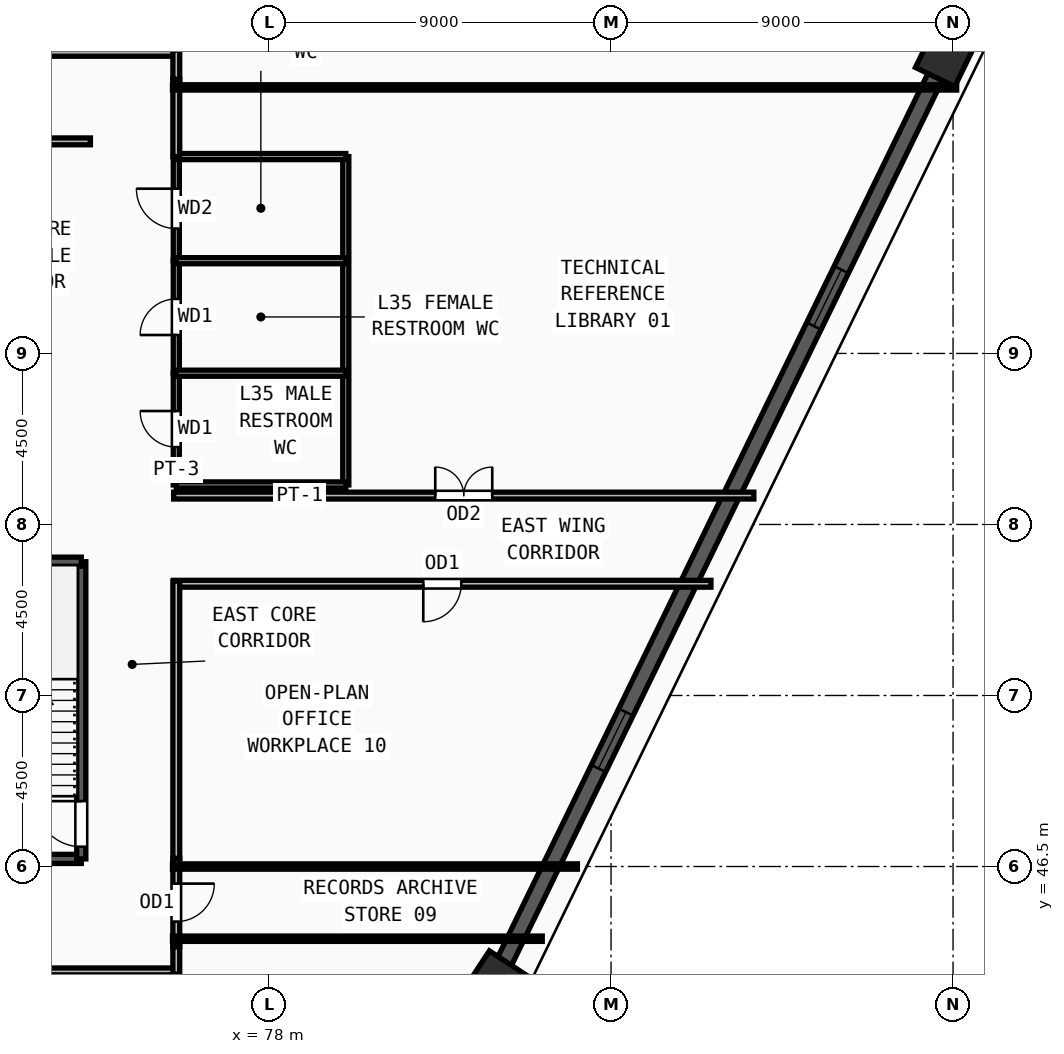
"""IFC4 building model, lengths in metres.
Left out: names, types, materials, properties, quantities, classifications, styles, units other than length and angle.
Written with IfcOpenShell. Run it as: python <this file> out.ifc"""

import sys

from ifc_helpers import new_model, si_unit, direction, frame, frame_2d, origin, origin_2d, place, context, subcontext, project, spatial, rectangle, extrude, source, transform, mapped, element, fill, save


model = new_model("IFC4")
c1 = context("Model", 3, precision=1e-05, world=origin(), true_north=direction((0.0, 1.0)))
c2 = subcontext(c1, "Body", "Model", "MODEL_VIEW")
j1 = project(units=[si_unit("LENGTHUNIT", "METRE"), si_unit("PLANEANGLEUNIT", "RADIAN")], contexts=[c1])
p1 = place(None, origin())
s1 = spatial("IfcSite", under=j1, at=p1, CompositionType="ELEMENT")
p2 = place(p1, origin())
s2 = spatial("IfcBuilding", under=s1, at=p2, CompositionType="ELEMENT")
p3 = place(p2, frame((0.0, 0.0, 135.75)))
s3 = spatial("IfcBuildingStorey", under=s2, at=p3, CompositionType="ELEMENT", Elevation=135.75)
m1 = source(origin(), c2, "Body", "SweptSolid", [
    extrude(rectangle(XDim=1.4, YDim=1.15, at=origin_2d()), origin(), (0.0, 0.0, 1.0), 3.75),
])
for number, where, z_axis, x_axis in (
    (1, (95.834, 67.903, 0.0), (0.0, 0.0, 1.0), (0.438, 0.899, 0.0)),
    (2, (83.895, 43.38, 0.0), (0.0, 0.0, 1.0), (0.55, 0.835, 0.0)),
):
    element("IfcColumn", number, at=place(p3, frame(where, z_axis=z_axis, x_axis=x_axis)), inside=s3, PredefinedType="COLUMN", context=c2, shape_type="MappedRepresentation", body=[
        mapped(m1, transform((0.0, 0.0, 0.0), x_axis=(1.0, 0.0, 0.0), y_axis=(0.0, 1.0, 0.0), z_axis=(0.0, 0.0, 1.0), scale=1.0)),
    ])
p4 = place(p3, frame((84.197, 44.0, 0.0), z_axis=(0.0, 0.0, 1.0), x_axis=(0.4377191358, 0.899111760658, 0.0)))
e3 = element("IfcWall", 3, at=p4, inside=s3, PredefinedType="SOLIDWALL", context=c2, shape_type="SweptSolid", body=[
    extrude(rectangle(XDim=25.896, YDim=0.42, at=frame_2d((12.948, 0.0))), origin(), (0.0, 0.0, 1.0), 3.47),
])
m2 = source(origin(), c2, "Body", "SweptSolid", [
    extrude(rectangle(XDim=1.65, YDim=1.95, at=frame_2d((0.825, 0.975))), frame((0.0, 0.22, 0.0), z_axis=(0.0, -1.0, 0.0), x_axis=(1.0, 0.0, 0.0)), (0.0, 0.0, 1.0), 0.44),
])
p5 = place(p4, frame((5.649, 0.0, 0.55)))
e4 = element("IfcOpeningElement", 4, at=p5, cuts=e3, PredefinedType="OPENING", context=c2, shape_type="MappedRepresentation", body=[
    mapped(m2, transform((0.0, 0.0, 0.0), x_axis=(1.0, 0.0, 0.0), y_axis=(0.0, 1.0, 0.0), z_axis=(0.0, 0.0, 1.0), scale=1.0)),
])
p6 = place(p4, frame((18.597, 0.0, 0.55)))
e5 = element("IfcOpeningElement", 5, at=p6, cuts=e3, PredefinedType="OPENING", context=c2, shape_type="MappedRepresentation", body=[
    mapped(m2, transform((0.0, 0.0, 0.0), x_axis=(1.0, 0.0, 0.0), y_axis=(0.0, 1.0, 0.0), z_axis=(0.0, 0.0, 1.0), scale=1.0)),
])
p7 = place(p3, frame((69.62, 46.7, 0.0), z_axis=(0.0, 0.0, 1.0), x_axis=(1.0, 0.0, 0.0)))
e6 = element("IfcWall", 6, at=p7, inside=s3, PredefinedType="SOLIDWALL", context=c2, shape_type="SweptSolid", body=[
    extrude(rectangle(XDim=3.44, YDim=0.24, at=frame_2d((1.72, 0.0))), origin(), (0.0, 0.0, 1.0), 3.47),
])
p8 = place(p3, frame((73.06, 46.7, 0.0), z_axis=(0.0, 0.0, 1.0), x_axis=(0.0, 1.0, 0.0)))
e7 = element("IfcWall", 7, at=p8, inside=s3, PredefinedType="SOLIDWALL", context=c2, shape_type="SweptSolid", body=[
    extrude(rectangle(XDim=7.82, YDim=0.24, at=frame_2d((3.91, 0.0))), origin(), (0.0, 0.0, 1.0), 3.47),
])
m3 = source(origin(), c2, "Body", "SweptSolid", [
    extrude(rectangle(XDim=1.2, YDim=2.2, at=frame_2d((0.6, 1.1))), frame((0.0, 0.13, 0.0), z_axis=(0.0, -1.0, 0.0), x_axis=(1.0, 0.0, 0.0)), (0.0, 0.0, 1.0), 0.26),
])
p9 = place(p8, frame((0.32, 0.0, 0.0)))
e8 = element("IfcOpeningElement", 8, at=p9, cuts=e7, PredefinedType="OPENING", context=c2, shape_type="MappedRepresentation", body=[
    mapped(m3, transform((0.0, 0.0, 0.0), x_axis=(1.0, 0.0, 0.0), y_axis=(0.0, 1.0, 0.0), z_axis=(0.0, 0.0, 1.0), scale=1.0)),
])
p10 = place(p3, frame((73.06, 54.52, 0.0), z_axis=(0.0, 0.0, 1.0), x_axis=(-1.0, 0.0, 0.0)))
e9 = element("IfcWall", 9, at=p10, inside=s3, PredefinedType="SOLIDWALL", context=c2, shape_type="SweptSolid", body=[
    extrude(rectangle(XDim=3.44, YDim=0.24, at=frame_2d((1.72, 0.0))), origin(), (0.0, 0.0, 1.0), 3.47),
])
p11 = place(p3, frame((75.56, 56.54, 0.0), z_axis=(0.0, 0.0, 1.0), x_axis=(0.0, 1.0, 0.0)))
e10 = element("IfcWall", 10, at=p11, inside=s3, PredefinedType="PARTITIONING", context=c2, shape_type="SweptSolid", body=[
    extrude(rectangle(XDim=2.94, YDim=0.16, at=frame_2d((1.47, 0.0))), origin(), (0.0, 0.0, 1.0), 3.47),
])
m4 = source(origin(), c2, "Body", "SweptSolid", [
    extrude(rectangle(XDim=0.95, YDim=2.15, at=frame_2d((0.475, 1.075))), frame((0.0, 0.09, 0.0), z_axis=(0.0, -1.0, 0.0), x_axis=(1.0, 0.0, 0.0)), (0.0, 0.0, 1.0), 0.18),
])
p12 = place(p11, frame((0.995, 0.0, 0.0)))
e11 = element("IfcOpeningElement", 11, at=p12, cuts=e10, PredefinedType="OPENING", context=c2, shape_type="MappedRepresentation", body=[
    mapped(m4, transform((0.0, 0.0, 0.0), x_axis=(1.0, 0.0, 0.0), y_axis=(0.0, 1.0, 0.0), z_axis=(0.0, 0.0, 1.0), scale=1.0)),
])
p13 = place(p3, frame((75.56, 59.48, 0.0), z_axis=(0.0, 0.0, 1.0), x_axis=(0.0, 1.0, 0.0)))
e12 = element("IfcWall", 12, at=p13, inside=s3, PredefinedType="PARTITIONING", context=c2, shape_type="SweptSolid", body=[
    extrude(rectangle(XDim=2.96, YDim=0.16, at=frame_2d((1.48, 0.0))), origin(), (0.0, 0.0, 1.0), 3.47),
])
p14 = place(p13, frame((1.005, 0.0, 0.0)))
e13 = element("IfcOpeningElement", 13, at=p14, cuts=e12, PredefinedType="OPENING", context=c2, shape_type="MappedRepresentation", body=[
    mapped(m4, transform((0.0, 0.0, 0.0), x_axis=(1.0, 0.0, 0.0), y_axis=(0.0, 1.0, 0.0), z_axis=(0.0, 0.0, 1.0), scale=1.0)),
])
p15 = place(p3, frame((75.56, 62.44, 0.0), z_axis=(0.0, 0.0, 1.0), x_axis=(0.0, 1.0, 0.0)))
e14 = element("IfcWall", 14, at=p15, inside=s3, PredefinedType="PARTITIONING", context=c2, shape_type="SweptSolid", body=[
    extrude(rectangle(XDim=2.74, YDim=0.16, at=frame_2d((1.37, 0.0))), origin(), (0.0, 0.0, 1.0), 3.47),
])
m5 = source(origin(), c2, "Body", "SweptSolid", [
    extrude(rectangle(XDim=1.05, YDim=2.15, at=frame_2d((0.525, 1.075))), frame((0.0, 0.09, 0.0), z_axis=(0.0, -1.0, 0.0), x_axis=(1.0, 0.0, 0.0)), (0.0, 0.0, 1.0), 0.18),
])
p16 = place(p15, frame((0.845, 0.0, 0.0)))
e15 = element("IfcOpeningElement", 15, at=p16, cuts=e14, PredefinedType="OPENING", context=c2, shape_type="MappedRepresentation", body=[
    mapped(m5, transform((0.0, 0.0, 0.0), x_axis=(1.0, 0.0, 0.0), y_axis=(0.0, 1.0, 0.0), z_axis=(0.0, 0.0, 1.0), scale=1.0)),
])
p17 = place(p3, frame((69.46, 65.58, 0.0), z_axis=(0.0, 0.0, 1.0), x_axis=(1.0, 0.0, 0.0)))
e16 = element("IfcWall", 16, at=p17, inside=s3, PredefinedType="PARTITIONING", context=c2, shape_type="SweptSolid", body=[
    extrude(rectangle(XDim=3.84, YDim=0.18, at=frame_2d((1.92, 0.0))), origin(), (0.0, 0.0, 1.0), 3.47),
])
m6 = source(origin(), c2, "Body", "SweptSolid", [
    extrude(rectangle(XDim=1.3, YDim=2.2, at=frame_2d((0.65, 1.1))), frame((0.0, 0.1, 0.0), z_axis=(0.0, -1.0, 0.0), x_axis=(1.0, 0.0, 0.0)), (0.0, 0.0, 1.0), 0.2),
])
p18 = place(p17, frame((1.27, 0.0, 0.0)))
e17 = element("IfcOpeningElement", 17, at=p18, cuts=e16, PredefinedType="OPENING", context=c2, shape_type="MappedRepresentation", body=[
    mapped(m6, transform((0.0, 0.0, 0.0), x_axis=(1.0, 0.0, 0.0), y_axis=(0.0, 1.0, 0.0), z_axis=(0.0, 0.0, 1.0), scale=1.0)),
])
p19 = place(p3, frame((75.49, 56.26, 0.0), z_axis=(0.0, 0.0, 1.0), x_axis=(1.0, 0.0, 0.0)))
e18 = element("IfcWall", 18, at=p19, inside=s3, PredefinedType="PARTITIONING", context=c2, shape_type="SweptSolid", body=[
    extrude(rectangle(XDim=15.268, YDim=0.18, at=frame_2d((7.634, 0.0))), origin(), (0.0, 0.0, 1.0), 3.47),
])
m7 = source(origin(), c2, "Body", "SweptSolid", [
    extrude(rectangle(XDim=1.5, YDim=2.2, at=frame_2d((0.75, 1.1))), frame((0.0, 0.1, 0.0), z_axis=(0.0, -1.0, 0.0), x_axis=(1.0, 0.0, 0.0)), (0.0, 0.0, 1.0), 0.2),
])
p20 = place(p19, frame((6.884, 0.0, 0.0)))
e19 = element("IfcOpeningElement", 19, at=p20, cuts=e18, PredefinedType="OPENING", context=c2, shape_type="MappedRepresentation", body=[
    mapped(m7, transform((0.0, 0.0, 0.0), x_axis=(1.0, 0.0, 0.0), y_axis=(0.0, 1.0, 0.0), z_axis=(0.0, 0.0, 1.0), scale=1.0)),
])
p21 = place(p3, frame((44.37, 67.91, 0.0), z_axis=(0.0, 0.0, 1.0), x_axis=(1.0, 0.0, 0.0)))
e20 = element("IfcWall", 20, at=p21, inside=s3, PredefinedType="PARTITIONING", context=c2, shape_type="SweptSolid", body=[
    extrude(rectangle(XDim=31.26, YDim=0.18, at=frame_2d((15.63, 0.0))), origin(), (0.0, 0.0, 1.0), 3.47),
])
p22 = place(p21, frame((14.88, 0.0, 0.0)))
e21 = element("IfcOpeningElement", 21, at=p22, cuts=e20, PredefinedType="OPENING", context=c2, shape_type="MappedRepresentation", body=[
    mapped(m7, transform((0.0, 0.0, 0.0), x_axis=(1.0, 0.0, 0.0), y_axis=(0.0, 1.0, 0.0), z_axis=(0.0, 0.0, 1.0), scale=1.0)),
])
p23 = place(p3, frame((75.63, 43.74, 0.0), z_axis=(0.0, 0.0, 1.0), x_axis=(-1.0, 0.0, 0.0)))
e22 = element("IfcWall", 22, at=p23, inside=s3, PredefinedType="PARTITIONING", context=c2, shape_type="SweptSolid", body=[
    extrude(rectangle(XDim=31.26, YDim=0.18, at=frame_2d((15.63, 0.0))), origin(), (0.0, 0.0, 1.0), 3.47),
])
p24 = place(p23, frame((10.08, 0.0, 0.0)))
e23 = element("IfcOpeningElement", 23, at=p24, cuts=e22, PredefinedType="OPENING", context=c2, shape_type="MappedRepresentation", body=[
    mapped(m7, transform((0.0, 0.0, 0.0), x_axis=(1.0, 0.0, 0.0), y_axis=(0.0, 1.0, 0.0), z_axis=(0.0, 0.0, 1.0), scale=1.0)),
])
p25 = place(p3, frame((75.56, 46.715, 0.0), z_axis=(0.0, 0.0, 1.0), x_axis=(0.0, -1.0, 0.0)))
e24 = element("IfcWall", 24, at=p25, inside=s3, PredefinedType="PARTITIONING", context=c2, shape_type="SweptSolid", body=[
    extrude(rectangle(XDim=2.33, YDim=0.18, at=frame_2d((1.165, 0.0))), origin(), (0.0, 0.0, 1.0), 3.055),
])
m8 = source(origin(), c2, "Body", "SweptSolid", [
    extrude(rectangle(XDim=1.0, YDim=2.2, at=frame_2d((0.5, 1.1))), frame((0.0, 0.1, 0.0), z_axis=(0.0, -1.0, 0.0), x_axis=(1.0, 0.0, 0.0)), (0.0, 0.0, 1.0), 0.2),
])
p26 = place(p25, frame((0.665, 0.0, 0.0)))
e25 = element("IfcOpeningElement", 25, at=p26, cuts=e24, PredefinedType="OPENING", context=c2, shape_type="MappedRepresentation", body=[
    mapped(m8, transform((0.0, 0.0, 0.0), x_axis=(1.0, 0.0, 0.0), y_axis=(0.0, 1.0, 0.0), z_axis=(0.0, 0.0, 1.0), scale=1.0)),
])
p27 = place(p3, frame((89.629, 53.94, 0.0), z_axis=(0.0, 0.0, 1.0), x_axis=(-1.0, 0.0, 0.0)))
e26 = element("IfcWall", 26, at=p27, inside=s3, PredefinedType="PARTITIONING", context=c2, shape_type="SweptSolid", body=[
    extrude(rectangle(XDim=14.139, YDim=0.18, at=frame_2d((7.069, 0.0))), origin(), (0.0, 0.0, 1.0), 3.47),
])
p28 = place(p27, frame((6.57, 0.0, 0.0)))
e27 = element("IfcOpeningElement", 27, at=p28, cuts=e26, PredefinedType="OPENING", context=c2, shape_type="MappedRepresentation", body=[
    mapped(m8, transform((0.0, 0.0, 0.0), x_axis=(1.0, 0.0, 0.0), y_axis=(0.0, 1.0, 0.0), z_axis=(0.0, 0.0, 1.0), scale=1.0)),
])
p29 = place(p3, frame((80.02, 56.54, 0.0), z_axis=(0.0, 0.0, 1.0), x_axis=(0.0, 1.0, 0.0)))
e28 = element("IfcWall", 28, at=p29, inside=s3, PredefinedType="PARTITIONING", context=c2, shape_type="SweptSolid", body=[
    extrude(rectangle(XDim=8.64, YDim=0.16, at=frame_2d((4.32, 0.0))), origin(), (0.0, 0.0, 1.0), 3.055),
])
for number, where, z_axis, x_axis in (
    (29, (75.56, 56.54, 0.0), (0.0, 0.0, 1.0), (1.0, 0.0, 0.0)),
    (30, (75.56, 59.48, 0.0), (0.0, 0.0, 1.0), (1.0, 0.0, 0.0)),
    (31, (75.56, 62.44, 0.0), (0.0, 0.0, 1.0), (1.0, 0.0, 0.0)),
    (32, (75.56, 65.18, 0.0), (0.0, 0.0, 1.0), (1.0, 0.0, 0.0)),
):
    element("IfcWall", number, at=place(p3, frame(where, z_axis=z_axis, x_axis=x_axis)), inside=s3, PredefinedType="PARTITIONING", context=c2, shape_type="SweptSolid", body=[
        extrude(rectangle(XDim=4.46, YDim=0.16, at=frame_2d((2.23, 0.0))), origin(), (0.0, 0.0, 1.0), 3.47),
    ])
p30 = place(p3, frame((75.56, 67.215, 0.0), z_axis=(0.0, 0.0, 1.0), x_axis=(0.0, -1.0, 0.0)))
e33 = element("IfcWall", 33, at=p30, inside=s3, PredefinedType="PARTITIONING", context=c2, shape_type="SweptSolid", body=[
    extrude(rectangle(XDim=2.035, YDim=0.18, at=frame_2d((1.018, 0.0))), origin(), (0.0, 0.0, 1.0), 3.47),
])
p31 = place(p3, frame((75.56, 67.98, 0.0), z_axis=(0.0, 0.0, 1.0), x_axis=(0.0, -1.0, 0.0)))
e34 = element("IfcWall", 34, at=p31, inside=s3, PredefinedType="PARTITIONING", context=c2, shape_type="SweptSolid", body=[
    extrude(rectangle(XDim=0.765, YDim=0.18, at=frame_2d((0.382, 0.0))), origin(), (0.0, 0.0, 1.0), 3.47),
])
p32 = place(p3, frame((75.56, 44.385, 0.0), z_axis=(0.0, 0.0, 1.0), x_axis=(0.0, -1.0, 0.0)))
e35 = element("IfcWall", 35, at=p32, inside=s3, PredefinedType="PARTITIONING", context=c2, shape_type="SweptSolid", body=[
    extrude(rectangle(XDim=0.715, YDim=0.18, at=frame_2d((0.357, 0.0))), origin(), (0.0, 0.0, 1.0), 3.47),
])
p33 = place(p3, frame((75.56, 54.01, 0.0), z_axis=(0.0, 0.0, 1.0), x_axis=(0.0, -1.0, 0.0)))
e36 = element("IfcWall", 36, at=p33, inside=s3, PredefinedType="PARTITIONING", context=c2, shape_type="SweptSolid", body=[
    extrude(rectangle(XDim=7.295, YDim=0.18, at=frame_2d((3.647, 0.0))), origin(), (0.0, 0.0, 1.0), 3.47),
])
p34 = place(p3, frame((75.46, 44.6, 0.0), z_axis=(0.0, 0.0, 1.0), x_axis=(1.0, 0.0, 0.0)))
e37 = element("IfcWall", 37, at=p34, inside=s3, PredefinedType="PARTITIONING", context=c2, shape_type="SweptSolid", body=[
    extrude(rectangle(XDim=9.73, YDim=0.14, at=frame_2d((4.865, 0.0))), origin(), (0.0, 0.0, 1.0), 3.47),
])
p35 = place(p3, frame((75.46, 46.5, 0.0), z_axis=(0.0, 0.0, 1.0), x_axis=(1.0, 0.0, 0.0)))
e38 = element("IfcWall", 38, at=p35, inside=s3, PredefinedType="PARTITIONING", context=c2, shape_type="SweptSolid", body=[
    extrude(rectangle(XDim=10.655, YDim=0.14, at=frame_2d((5.328, 0.0))), origin(), (0.0, 0.0, 1.0), 3.47),
])
p36 = place(p3, frame((75.46, 67.0, 0.0), z_axis=(0.0, 0.0, 1.0), x_axis=(1.0, 0.0, 0.0)))
e39 = element("IfcWall", 39, at=p36, inside=s3, PredefinedType="PARTITIONING", context=c2, shape_type="SweptSolid", body=[
    extrude(rectangle(XDim=20.635, YDim=0.14, at=frame_2d((10.317, 0.0))), origin(), (0.0, 0.0, 1.0), 2.655),
])
m9 = source(origin(), c2, "Body", "SweptSolid", [
    extrude(rectangle(XDim=1.65, YDim=1.95, at=frame_2d((0.825, 0.975))), frame((0.0, 0.03, 0.0), z_axis=(0.0, -1.0, 0.0), x_axis=(1.0, 0.0, 0.0)), (0.0, 0.0, 1.0), 0.06),
])
p37 = place(p5, origin())
e40 = element("IfcWindow", 40, at=p37, inside=s3, PartitioningType="DOUBLE_PANEL_VERTICAL", PredefinedType="WINDOW", context=c2, shape_type="MappedRepresentation", body=[
    mapped(m9, transform((0.0, 0.0, 0.0), x_axis=(1.0, 0.0, 0.0), y_axis=(0.0, 1.0, 0.0), z_axis=(0.0, 0.0, 1.0), scale=1.0)),
])
fill(e4, e40)
p38 = place(p6, origin())
e41 = element("IfcWindow", 41, at=p38, inside=s3, PartitioningType="DOUBLE_PANEL_VERTICAL", PredefinedType="WINDOW", context=c2, shape_type="MappedRepresentation", body=[
    mapped(m9, transform((0.0, 0.0, 0.0), x_axis=(1.0, 0.0, 0.0), y_axis=(0.0, 1.0, 0.0), z_axis=(0.0, 0.0, 1.0), scale=1.0)),
])
fill(e5, e41)
m10 = source(origin(), c2, "Body", "SweptSolid", [
    extrude(rectangle(XDim=1.2, YDim=2.2, at=frame_2d((0.6, 1.1))), frame((0.0, 0.025, 0.0), z_axis=(0.0, -1.0, 0.0), x_axis=(1.0, 0.0, 0.0)), (0.0, 0.0, 1.0), 0.05),
])
p39 = place(p9, origin())
e42 = element("IfcDoor", 42, at=p39, inside=s3, OperationType="SINGLE_SWING_RIGHT", PredefinedType="DOOR", context=c2, shape_type="MappedRepresentation", body=[
    mapped(m10, transform((0.0, 0.0, 0.0), x_axis=(1.0, 0.0, 0.0), y_axis=(0.0, 1.0, 0.0), z_axis=(0.0, 0.0, 1.0), scale=1.0)),
])
fill(e8, e42)
m11 = source(origin(), c2, "Body", "SweptSolid", [
    extrude(rectangle(XDim=0.95, YDim=2.15, at=frame_2d((0.475, 1.075))), frame((0.0, 0.025, 0.0), z_axis=(0.0, -1.0, 0.0), x_axis=(1.0, 0.0, 0.0)), (0.0, 0.0, 1.0), 0.05),
])
p40 = place(p12, origin())
e43 = element("IfcDoor", 43, at=p40, inside=s3, OperationType="SINGLE_SWING_RIGHT", PredefinedType="DOOR", context=c2, shape_type="MappedRepresentation", body=[
    mapped(m11, transform((0.0, 0.0, 0.0), x_axis=(1.0, 0.0, 0.0), y_axis=(0.0, 1.0, 0.0), z_axis=(0.0, 0.0, 1.0), scale=1.0)),
])
fill(e11, e43)
p41 = place(p14, origin())
e44 = element("IfcDoor", 44, at=p41, inside=s3, OperationType="SINGLE_SWING_LEFT", PredefinedType="DOOR", context=c2, shape_type="MappedRepresentation", body=[
    mapped(m11, transform((0.0, 0.0, 0.0), x_axis=(1.0, 0.0, 0.0), y_axis=(0.0, 1.0, 0.0), z_axis=(0.0, 0.0, 1.0), scale=1.0)),
])
fill(e13, e44)
m12 = source(origin(), c2, "Body", "SweptSolid", [
    extrude(rectangle(XDim=1.05, YDim=2.15, at=frame_2d((0.525, 1.075))), frame((0.0, 0.025, 0.0), z_axis=(0.0, -1.0, 0.0), x_axis=(1.0, 0.0, 0.0)), (0.0, 0.0, 1.0), 0.05),
])
p42 = place(p16, origin())
e45 = element("IfcDoor", 45, at=p42, inside=s3, OperationType="SINGLE_SWING_RIGHT", PredefinedType="DOOR", context=c2, shape_type="MappedRepresentation", body=[
    mapped(m12, transform((0.0, 0.0, 0.0), x_axis=(1.0, 0.0, 0.0), y_axis=(0.0, 1.0, 0.0), z_axis=(0.0, 0.0, 1.0), scale=1.0)),
])
fill(e15, e45)
m13 = source(origin(), c2, "Body", "SweptSolid", [
    extrude(rectangle(XDim=1.5, YDim=2.2, at=frame_2d((0.75, 1.1))), frame((0.0, 0.025, 0.0), z_axis=(0.0, -1.0, 0.0), x_axis=(1.0, 0.0, 0.0)), (0.0, 0.0, 1.0), 0.05),
])
p43 = place(p20, origin())
e46 = element("IfcDoor", 46, at=p43, inside=s3, OperationType="DOUBLE_DOOR_SINGLE_SWING", PredefinedType="DOOR", context=c2, shape_type="MappedRepresentation", body=[
    mapped(m13, transform((0.0, 0.0, 0.0), x_axis=(1.0, 0.0, 0.0), y_axis=(0.0, 1.0, 0.0), z_axis=(0.0, 0.0, 1.0), scale=1.0)),
])
fill(e19, e46)
m14 = source(origin(), c2, "Body", "SweptSolid", [
    extrude(rectangle(XDim=1.0, YDim=2.2, at=frame_2d((0.5, 1.1))), frame((0.0, 0.025, 0.0), z_axis=(0.0, -1.0, 0.0), x_axis=(1.0, 0.0, 0.0)), (0.0, 0.0, 1.0), 0.05),
])
p44 = place(p26, origin())
e47 = element("IfcDoor", 47, at=p44, inside=s3, OperationType="SINGLE_SWING_LEFT", PredefinedType="DOOR", context=c2, shape_type="MappedRepresentation", body=[
    mapped(m14, transform((0.0, 0.0, 0.0), x_axis=(1.0, 0.0, 0.0), y_axis=(0.0, 1.0, 0.0), z_axis=(0.0, 0.0, 1.0), scale=1.0)),
])
fill(e25, e47)
p45 = place(p28, origin())
e48 = element("IfcDoor", 48, at=p45, inside=s3, OperationType="SINGLE_SWING_RIGHT", PredefinedType="DOOR", context=c2, shape_type="MappedRepresentation", body=[
    mapped(m14, transform((0.0, 0.0, 0.0), x_axis=(1.0, 0.0, 0.0), y_axis=(0.0, 1.0, 0.0), z_axis=(0.0, 0.0, 1.0), scale=1.0)),
])
fill(e27, e48)
save(model, sys.argv[1])
